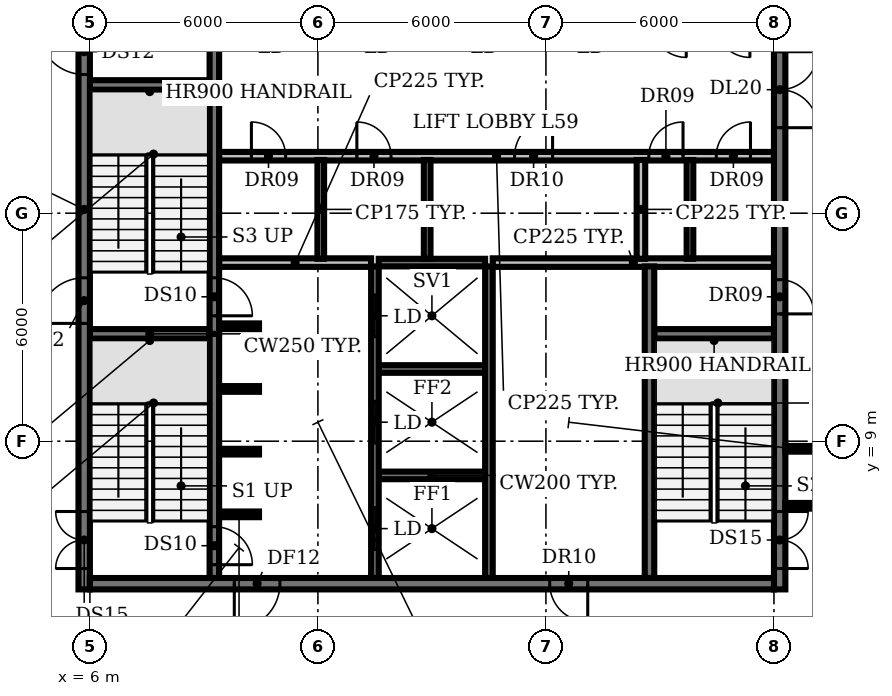
"""IFC4 building model, lengths in metres.
Left out: names, types, materials, properties, quantities, classifications, styles, units other than length and angle.
Written with IfcOpenShell. Run it as: python <this file> out.ifc"""

import sys

from ifc_helpers import new_model, si_unit, direction, frame, frame_2d, origin, place, context, subcontext, project, spatial, rectangle, extrude, element, fill, save


model = new_model("IFC4")
c1 = context("Model", 3, precision=1e-05, world=origin(), true_north=direction((0.0, 1.0)))
c2 = subcontext(c1, "Body", "Model", "MODEL_VIEW")
j1 = project(units=[si_unit("LENGTHUNIT", "METRE"), si_unit("PLANEANGLEUNIT", "RADIAN")], contexts=[c1])
p1 = place(None, origin())
s1 = spatial("IfcSite", under=j1, at=p1, CompositionType="ELEMENT")
p2 = place(p1, origin())
s2 = spatial("IfcBuilding", under=s1, at=p2, CompositionType="ELEMENT")
p3 = place(p2, frame((0.0, 0.0, 268.4)))
s3 = spatial("IfcBuildingStorey", under=s2, at=p3, CompositionType="ELEMENT", Elevation=268.4)
p4 = place(p3, frame((9.4, 7.075, 0.0), z_axis=(0.0, 0.0, 1.0), x_axis=(1.0, 0.0, 0.0)))
e1 = element("IfcWall", 1, at=p4, inside=s3, PredefinedType="SHEAR", context=c2, shape_type="SweptSolid", body=[
    extrude(rectangle(XDim=1.05, YDim=0.15, at=frame_2d((0.525, 0.0))), origin(), (0.0, 0.0, 1.0), 3.8),
])
p5 = place(p3, frame((13.6, 8.1, 0.0), z_axis=(0.0, 0.0, 1.0), x_axis=(1.0, 0.0, 0.0)))
e2 = element("IfcWall", 2, at=p5, inside=s3, PredefinedType="SHEAR", context=c2, shape_type="SweptSolid", body=[
    extrude(rectangle(XDim=2.8, YDim=0.2, at=frame_2d((1.4, 0.0))), origin(), (0.0, 0.0, 1.0), 3.8),
])
for number, where, z_axis, x_axis in (
    (3, (9.4, 8.725, 0.0), (0.0, 0.0, 1.0), (1.0, 0.0, 0.0)),
    (4, (9.4, 10.375, 0.0), (0.0, 0.0, 1.0), (1.0, 0.0, 0.0)),
):
    element("IfcWall", number, at=place(p3, frame(where, z_axis=z_axis, x_axis=x_axis)), inside=s3, PredefinedType="SHEAR", context=c2, shape_type="SweptSolid", body=[
        extrude(rectangle(XDim=1.05, YDim=0.15, at=frame_2d((0.525, 0.0))), origin(), (0.0, 0.0, 1.0), 3.8),
    ])
p6 = place(p3, frame((13.6, 10.9, 0.0), z_axis=(0.0, 0.0, 1.0), x_axis=(1.0, 0.0, 0.0)))
e5 = element("IfcWall", 5, at=p6, inside=s3, PredefinedType="SHEAR", context=c2, shape_type="SweptSolid", body=[
    extrude(rectangle(XDim=2.8, YDim=0.2, at=frame_2d((1.4, 0.0))), origin(), (0.0, 0.0, 1.0), 3.8),
])
for number, where, z_axis, x_axis in (
    (6, (6.0, 11.825, 0.0), (0.0, 0.0, 1.0), (1.0, 0.0, 0.0)),
    (7, (20.85, 11.825, 0.0), (0.0, 0.0, 1.0), (1.0, 0.0, 0.0)),
):
    element("IfcWall", number, at=place(p3, frame(where, z_axis=z_axis, x_axis=x_axis)), inside=s3, PredefinedType="SHEAR", context=c2, shape_type="SweptSolid", body=[
        extrude(rectangle(XDim=3.15, YDim=0.25, at=frame_2d((1.575, 0.0))), origin(), (0.0, 0.0, 1.0), 3.8),
    ])
p7 = place(p3, frame((9.4, 12.025, 0.0), z_axis=(0.0, 0.0, 1.0), x_axis=(1.0, 0.0, 0.0)))
e8 = element("IfcWall", 8, at=p7, inside=s3, PredefinedType="SHEAR", context=c2, shape_type="SweptSolid", body=[
    extrude(rectangle(XDim=1.05, YDim=0.15, at=frame_2d((0.525, 0.0))), origin(), (0.0, 0.0, 1.0), 3.8),
])
p8 = place(p3, frame((9.4, 13.7, 0.0), z_axis=(0.0, 0.0, 1.0), x_axis=(1.0, 0.0, 0.0)))
e9 = element("IfcWall", 9, at=p8, inside=s3, PredefinedType="PARTITIONING", context=c2, shape_type="SweptSolid", body=[
    extrude(rectangle(XDim=4.0, YDim=0.225, at=frame_2d((2.0, 0.0))), origin(), (0.0, 0.0, 1.0), 3.8),
])
p9 = place(p3, frame((13.6, 13.7, 0.0), z_axis=(0.0, 0.0, 1.0), x_axis=(1.0, 0.0, 0.0)))
e10 = element("IfcWall", 10, at=p9, inside=s3, PredefinedType="SHEAR", context=c2, shape_type="SweptSolid", body=[
    extrude(rectangle(XDim=2.8, YDim=0.2, at=frame_2d((1.4, 0.0))), origin(), (0.0, 0.0, 1.0), 3.8),
])
p10 = place(p3, frame((16.6, 13.7, 0.0), z_axis=(0.0, 0.0, 1.0), x_axis=(1.0, 0.0, 0.0)))
e11 = element("IfcWall", 11, at=p10, inside=s3, PredefinedType="PARTITIONING", context=c2, shape_type="SweptSolid", body=[
    extrude(rectangle(XDim=7.4, YDim=0.225, at=frame_2d((3.7, 0.0))), origin(), (0.0, 0.0, 1.0), 3.8),
])
p11 = place(p3, frame((9.4, 16.5, 0.0), z_axis=(0.0, 0.0, 1.0), x_axis=(1.0, 0.0, 0.0)))
e12 = element("IfcWall", 12, at=p11, inside=s3, PredefinedType="PARTITIONING", context=c2, shape_type="SweptSolid", body=[
    extrude(rectangle(XDim=14.6, YDim=0.225, at=frame_2d((7.3, 0.0))), origin(), (0.0, 0.0, 1.0), 3.8),
])
p12 = place(p11, frame((0.85, 0.0, 0.0)))
e13 = element("IfcOpeningElement", 13, at=p12, cuts=e12, PredefinedType="OPENING", context=c2, shape_type="SweptSolid", body=[
    extrude(rectangle(XDim=0.9, YDim=2.1, at=frame_2d((0.45, 1.05))), frame((0.0, 0.123, 0.0), z_axis=(0.0, -1.0, 0.0), x_axis=(1.0, 0.0, 0.0)), (0.0, 0.0, 1.0), 0.245),
])
p13 = place(p11, frame((3.625, 0.0, 0.0)))
e14 = element("IfcOpeningElement", 14, at=p13, cuts=e12, PredefinedType="OPENING", context=c2, shape_type="SweptSolid", body=[
    extrude(rectangle(XDim=0.9, YDim=2.1, at=frame_2d((0.45, 1.05))), frame((0.0, 0.123, 0.0), z_axis=(0.0, -1.0, 0.0), x_axis=(1.0, 0.0, 0.0)), (0.0, 0.0, 1.0), 0.245),
])
p14 = place(p11, frame((7.775, 0.0, 0.0)))
e15 = element("IfcOpeningElement", 15, at=p14, cuts=e12, PredefinedType="OPENING", context=c2, shape_type="SweptSolid", body=[
    extrude(rectangle(XDim=1.0, YDim=2.1, at=frame_2d((0.5, 1.05))), frame((0.0, 0.123, 0.0), z_axis=(0.0, -1.0, 0.0), x_axis=(1.0, 0.0, 0.0)), (0.0, 0.0, 1.0), 0.245),
])
p15 = place(p11, frame((11.308, 0.0, 0.0)))
e16 = element("IfcOpeningElement", 16, at=p15, cuts=e12, PredefinedType="OPENING", context=c2, shape_type="SweptSolid", body=[
    extrude(rectangle(XDim=0.9, YDim=2.1, at=frame_2d((0.45, 1.05))), frame((0.0, 0.123, 0.0), z_axis=(0.0, -1.0, 0.0), x_axis=(1.0, 0.0, 0.0)), (0.0, 0.0, 1.0), 0.245),
])
p16 = place(p11, frame((13.083, 0.0, 0.0)))
e17 = element("IfcOpeningElement", 17, at=p16, cuts=e12, PredefinedType="OPENING", context=c2, shape_type="SweptSolid", body=[
    extrude(rectangle(XDim=0.9, YDim=2.1, at=frame_2d((0.45, 1.05))), frame((0.0, 0.123, 0.0), z_axis=(0.0, -1.0, 0.0), x_axis=(1.0, 0.0, 0.0)), (0.0, 0.0, 1.0), 0.245),
])
p17 = place(p3, frame((6.0, 18.375, 0.0), z_axis=(0.0, 0.0, 1.0), x_axis=(1.0, 0.0, 0.0)))
e18 = element("IfcWall", 18, at=p17, inside=s3, PredefinedType="SHEAR", context=c2, shape_type="SweptSolid", body=[
    extrude(rectangle(XDim=3.15, YDim=0.25, at=frame_2d((1.575, 0.0))), origin(), (0.0, 0.0, 1.0), 3.8),
])
p18 = place(p3, frame((9.275, 11.825, 0.0), z_axis=(0.0, 0.0, 1.0), x_axis=(0.0, -1.0, 0.0)))
e19 = element("IfcWall", 19, at=p18, inside=s3, PredefinedType="SHEAR", context=c2, shape_type="SweptSolid", body=[
    extrude(rectangle(XDim=6.425, YDim=0.25, at=frame_2d((3.212, 0.0))), origin(), (0.0, 0.0, 1.0), 3.8),
])
p19 = place(p18, frame((5.075, 0.0, 0.0)))
e20 = element("IfcOpeningElement", 20, at=p19, cuts=e19, PredefinedType="OPENING", context=c2, shape_type="SweptSolid", body=[
    extrude(rectangle(XDim=1.0, YDim=2.1, at=frame_2d((0.5, 1.05))), frame((0.0, 0.135, 0.0), z_axis=(0.0, -1.0, 0.0), x_axis=(1.0, 0.0, 0.0)), (0.0, 0.0, 1.0), 0.27),
])
p20 = place(p3, frame((9.275, 18.375, 0.0), z_axis=(0.0, 0.0, 1.0), x_axis=(0.0, -1.0, 0.0)))
e21 = element("IfcWall", 21, at=p20, inside=s3, PredefinedType="SHEAR", context=c2, shape_type="SweptSolid", body=[
    extrude(rectangle(XDim=6.55, YDim=0.25, at=frame_2d((3.275, 0.0))), origin(), (0.0, 0.0, 1.0), 3.8),
])
p21 = place(p20, frame((5.075, 0.0, 0.0)))
e22 = element("IfcOpeningElement", 22, at=p21, cuts=e21, PredefinedType="OPENING", context=c2, shape_type="SweptSolid", body=[
    extrude(rectangle(XDim=1.0, YDim=2.1, at=frame_2d((0.5, 1.05))), frame((0.0, 0.135, 0.0), z_axis=(0.0, -1.0, 0.0), x_axis=(1.0, 0.0, 0.0)), (0.0, 0.0, 1.0), 0.27),
])
p22 = place(p3, frame((9.275, 18.375, 0.0), z_axis=(0.0, 0.0, 1.0), x_axis=(0.0, 1.0, 0.0)))
e23 = element("IfcWall", 23, at=p22, inside=s3, PredefinedType="SHEAR", context=c2, shape_type="SweptSolid", body=[
    extrude(rectangle(XDim=6.425, YDim=0.25, at=frame_2d((3.212, 0.0))), origin(), (0.0, 0.0, 1.0), 3.8),
])
p23 = place(p3, frame((12.075, 13.8, 0.0), z_axis=(0.0, 0.0, 1.0), x_axis=(0.0, 1.0, 0.0)))
e24 = element("IfcWall", 24, at=p23, inside=s3, PredefinedType="PARTITIONING", context=c2, shape_type="SweptSolid", body=[
    extrude(rectangle(XDim=2.6, YDim=0.175, at=frame_2d((1.3, 0.0))), origin(), (0.0, 0.0, 1.0), 3.8),
])
p24 = place(p3, frame((13.5, 5.4, 0.0), z_axis=(0.0, 0.0, 1.0), x_axis=(0.0, 1.0, 0.0)))
e25 = element("IfcWall", 25, at=p24, inside=s3, PredefinedType="SHEAR", context=c2, shape_type="SweptSolid", body=[
    extrude(rectangle(XDim=8.2, YDim=0.2, at=frame_2d((4.1, 0.0))), origin(), (0.0, 0.0, 1.0), 3.8),
])
p25 = place(p24, frame((0.75, 0.0, 0.0)))
e26 = element("IfcOpeningElement", 26, at=p25, cuts=e25, PredefinedType="OPENING", context=c2, shape_type="SweptSolid", body=[
    extrude(rectangle(XDim=1.1, YDim=2.1, at=frame_2d((0.55, 1.05))), frame((0.0, 0.11, 0.0), z_axis=(0.0, -1.0, 0.0), x_axis=(1.0, 0.0, 0.0)), (0.0, 0.0, 1.0), 0.22),
])
p26 = place(p24, frame((3.55, 0.0, 0.0)))
e27 = element("IfcOpeningElement", 27, at=p26, cuts=e25, PredefinedType="OPENING", context=c2, shape_type="SweptSolid", body=[
    extrude(rectangle(XDim=1.1, YDim=2.1, at=frame_2d((0.55, 1.05))), frame((0.0, 0.11, 0.0), z_axis=(0.0, -1.0, 0.0), x_axis=(1.0, 0.0, 0.0)), (0.0, 0.0, 1.0), 0.22),
])
p27 = place(p24, frame((6.35, 0.0, 0.0)))
e28 = element("IfcOpeningElement", 28, at=p27, cuts=e25, PredefinedType="OPENING", context=c2, shape_type="SweptSolid", body=[
    extrude(rectangle(XDim=1.1, YDim=2.1, at=frame_2d((0.55, 1.05))), frame((0.0, 0.11, 0.0), z_axis=(0.0, -1.0, 0.0), x_axis=(1.0, 0.0, 0.0)), (0.0, 0.0, 1.0), 0.22),
])
p28 = place(p3, frame((14.875, 13.8, 0.0), z_axis=(0.0, 0.0, 1.0), x_axis=(0.0, 1.0, 0.0)))
e29 = element("IfcWall", 29, at=p28, inside=s3, PredefinedType="PARTITIONING", context=c2, shape_type="SweptSolid", body=[
    extrude(rectangle(XDim=2.6, YDim=0.175, at=frame_2d((1.3, 0.0))), origin(), (0.0, 0.0, 1.0), 3.8),
])
p29 = place(p3, frame((16.5, 5.4, 0.0), z_axis=(0.0, 0.0, 1.0), x_axis=(0.0, 1.0, 0.0)))
e30 = element("IfcWall", 30, at=p29, inside=s3, PredefinedType="SHEAR", context=c2, shape_type="SweptSolid", body=[
    extrude(rectangle(XDim=8.2, YDim=0.2, at=frame_2d((4.1, 0.0))), origin(), (0.0, 0.0, 1.0), 3.8),
])
p30 = place(p3, frame((20.5, 13.8, 0.0), z_axis=(0.0, 0.0, 1.0), x_axis=(0.0, 1.0, 0.0)))
e31 = element("IfcWall", 31, at=p30, inside=s3, PredefinedType="PARTITIONING", context=c2, shape_type="SweptSolid", body=[
    extrude(rectangle(XDim=2.6, YDim=0.225, at=frame_2d((1.3, 0.0))), origin(), (0.0, 0.0, 1.0), 3.8),
])
p31 = place(p3, frame((20.725, 5.4, 0.0), z_axis=(0.0, 0.0, 1.0), x_axis=(0.0, 1.0, 0.0)))
e32 = element("IfcWall", 32, at=p31, inside=s3, PredefinedType="SHEAR", context=c2, shape_type="SweptSolid", body=[
    extrude(rectangle(XDim=8.2, YDim=0.25, at=frame_2d((4.1, 0.0))), origin(), (0.0, 0.0, 1.0), 3.8),
])
p32 = place(p3, frame((21.79, 13.8, 0.0), z_axis=(0.0, 0.0, 1.0), x_axis=(0.0, 1.0, 0.0)))
e33 = element("IfcWall", 33, at=p32, inside=s3, PredefinedType="PARTITIONING", context=c2, shape_type="SweptSolid", body=[
    extrude(rectangle(XDim=2.6, YDim=0.175, at=frame_2d((1.3, 0.0))), origin(), (0.0, 0.0, 1.0), 3.8),
])
p33 = place(p3, frame((5.85, 5.1, 0.0), z_axis=(0.0, 0.0, 1.0), x_axis=(0.0, 1.0, 0.0)))
e34 = element("IfcWall", 34, at=p33, inside=s3, PredefinedType="SHEAR", context=c2, shape_type="SweptSolid", body=[
    extrude(rectangle(XDim=20.0, YDim=0.3, at=frame_2d((10.0, 0.0))), origin(), (0.0, 0.0, 1.0), 3.8),
])
p34 = place(p33, frame((0.55, 0.0, 0.0)))
e35 = element("IfcOpeningElement", 35, at=p34, cuts=e34, PredefinedType="OPENING", context=c2, shape_type="SweptSolid", body=[
    extrude(rectangle(XDim=1.5, YDim=2.1, at=frame_2d((0.75, 1.05))), frame((0.0, 0.16, 0.0), z_axis=(0.0, -1.0, 0.0), x_axis=(1.0, 0.0, 0.0)), (0.0, 0.0, 1.0), 0.32),
])
p35 = place(p33, frame((7.0, 0.0, 0.0)))
e36 = element("IfcOpeningElement", 36, at=p35, cuts=e34, PredefinedType="OPENING", context=c2, shape_type="SweptSolid", body=[
    extrude(rectangle(XDim=1.2, YDim=2.1, at=frame_2d((0.6, 1.05))), frame((0.0, 0.16, 0.0), z_axis=(0.0, -1.0, 0.0), x_axis=(1.0, 0.0, 0.0)), (0.0, 0.0, 1.0), 0.32),
])
p36 = place(p33, frame((13.55, 0.0, 0.0)))
e37 = element("IfcOpeningElement", 37, at=p36, cuts=e34, PredefinedType="OPENING", context=c2, shape_type="SweptSolid", body=[
    extrude(rectangle(XDim=1.2, YDim=2.1, at=frame_2d((0.6, 1.05))), frame((0.0, 0.16, 0.0), z_axis=(0.0, -1.0, 0.0), x_axis=(1.0, 0.0, 0.0)), (0.0, 0.0, 1.0), 0.32),
])
p37 = place(p3, frame((24.15, 25.655, 0.0), z_axis=(0.0, 0.0, 1.0), x_axis=(0.0, -1.0, 0.0)))
e38 = element("IfcWall", 38, at=p37, inside=s3, PredefinedType="SHEAR", context=c2, shape_type="SweptSolid", body=[
    extrude(rectangle(XDim=20.555, YDim=0.3, at=frame_2d((10.277, 0.0))), origin(), (0.0, 0.0, 1.0), 3.8),
])
p38 = place(p37, frame((18.505, 0.0, 0.0)))
e39 = element("IfcOpeningElement", 39, at=p38, cuts=e38, PredefinedType="OPENING", context=c2, shape_type="SweptSolid", body=[
    extrude(rectangle(XDim=1.5, YDim=2.1, at=frame_2d((0.75, 1.05))), frame((0.0, 0.16, 0.0), z_axis=(0.0, -1.0, 0.0), x_axis=(1.0, 0.0, 0.0)), (0.0, 0.0, 1.0), 0.32),
])
p39 = place(p37, frame((12.405, 0.0, 0.0)))
e40 = element("IfcOpeningElement", 40, at=p39, cuts=e38, PredefinedType="OPENING", context=c2, shape_type="SweptSolid", body=[
    extrude(rectangle(XDim=0.9, YDim=2.1, at=frame_2d((0.45, 1.05))), frame((0.0, 0.16, 0.0), z_axis=(0.0, -1.0, 0.0), x_axis=(1.0, 0.0, 0.0)), (0.0, 0.0, 1.0), 0.32),
])
p40 = place(p37, frame((6.405, 0.0, 0.0)))
e41 = element("IfcOpeningElement", 41, at=p40, cuts=e38, PredefinedType="OPENING", context=c2, shape_type="SweptSolid", body=[
    extrude(rectangle(XDim=2.0, YDim=2.1, at=frame_2d((1.0, 1.05))), frame((0.0, 0.16, 0.0), z_axis=(0.0, -1.0, 0.0), x_axis=(1.0, 0.0, 0.0)), (0.0, 0.0, 1.0), 0.32),
])
p41 = place(p3, frame((24.0, 5.25, 0.0), z_axis=(0.0, 0.0, 1.0), x_axis=(-1.0, 0.0, 0.0)))
e42 = element("IfcWall", 42, at=p41, inside=s3, PredefinedType="SHEAR", context=c2, shape_type="SweptSolid", body=[
    extrude(rectangle(XDim=18.0, YDim=0.3, at=frame_2d((9.0, 0.0))), origin(), (0.0, 0.0, 1.0), 3.8),
])
p42 = place(p41, frame((13.0, 0.0, 0.0)))
e43 = element("IfcOpeningElement", 43, at=p42, cuts=e42, PredefinedType="OPENING", context=c2, shape_type="SweptSolid", body=[
    extrude(rectangle(XDim=1.2, YDim=2.1, at=frame_2d((0.6, 1.05))), frame((0.0, 0.16, 0.0), z_axis=(0.0, -1.0, 0.0), x_axis=(1.0, 0.0, 0.0)), (0.0, 0.0, 1.0), 0.32),
])
p43 = place(p41, frame((4.9, 0.0, 0.0)))
e44 = element("IfcOpeningElement", 44, at=p43, cuts=e42, PredefinedType="OPENING", context=c2, shape_type="SweptSolid", body=[
    extrude(rectangle(XDim=1.0, YDim=2.1, at=frame_2d((0.5, 1.05))), frame((0.0, 0.16, 0.0), z_axis=(0.0, -1.0, 0.0), x_axis=(1.0, 0.0, 0.0)), (0.0, 0.0, 1.0), 0.32),
])
for number, where, z_axis, x_axis in (
    (45, (24.3, 7.3, 0.0), (0.0, 0.0, 1.0), (1.0, 0.0, 0.0)),
    (46, (24.3, 8.8, 0.0), (0.0, 0.0, 1.0), (1.0, 0.0, 0.0)),
):
    element("IfcWall", number, at=place(p3, frame(where, z_axis=z_axis, x_axis=x_axis)), inside=s3, PredefinedType="PARTITIONING", context=c2, shape_type="SweptSolid", body=[
        extrude(rectangle(XDim=1.05, YDim=0.15, at=frame_2d((0.525, 0.0))), origin(), (0.0, 0.0, 1.0), 2.85),
    ])
p44 = place(p12, origin())
e47 = element("IfcDoor", 47, at=p44, inside=s3, OperationType="SINGLE_SWING_LEFT", PredefinedType="DOOR", context=c2, shape_type="SweptSolid", body=[
    extrude(rectangle(XDim=0.9, YDim=2.1, at=frame_2d((0.45, 1.05))), frame((0.0, 0.025, 0.0), z_axis=(0.0, -1.0, 0.0), x_axis=(1.0, 0.0, 0.0)), (0.0, 0.0, 1.0), 0.05),
])
fill(e13, e47)
p45 = place(p13, origin())
e48 = element("IfcDoor", 48, at=p45, inside=s3, OperationType="SINGLE_SWING_LEFT", PredefinedType="DOOR", context=c2, shape_type="SweptSolid", body=[
    extrude(rectangle(XDim=0.9, YDim=2.1, at=frame_2d((0.45, 1.05))), frame((0.0, 0.025, 0.0), z_axis=(0.0, -1.0, 0.0), x_axis=(1.0, 0.0, 0.0)), (0.0, 0.0, 1.0), 0.05),
])
fill(e14, e48)
p46 = place(p14, origin())
e49 = element("IfcDoor", 49, at=p46, inside=s3, OperationType="SINGLE_SWING_RIGHT", PredefinedType="DOOR", context=c2, shape_type="SweptSolid", body=[
    extrude(rectangle(XDim=1.0, YDim=2.1, at=frame_2d((0.5, 1.05))), frame((0.0, 0.025, 0.0), z_axis=(0.0, -1.0, 0.0), x_axis=(1.0, 0.0, 0.0)), (0.0, 0.0, 1.0), 0.05),
])
fill(e15, e49)
p47 = place(p15, origin())
e50 = element("IfcDoor", 50, at=p47, inside=s3, OperationType="SINGLE_SWING_RIGHT", PredefinedType="DOOR", context=c2, shape_type="SweptSolid", body=[
    extrude(rectangle(XDim=0.9, YDim=2.1, at=frame_2d((0.45, 1.05))), frame((0.0, 0.025, 0.0), z_axis=(0.0, -1.0, 0.0), x_axis=(1.0, 0.0, 0.0)), (0.0, 0.0, 1.0), 0.05),
])
fill(e16, e50)
p48 = place(p16, origin())
e51 = element("IfcDoor", 51, at=p48, inside=s3, OperationType="SINGLE_SWING_RIGHT", PredefinedType="DOOR", context=c2, shape_type="SweptSolid", body=[
    extrude(rectangle(XDim=0.9, YDim=2.1, at=frame_2d((0.45, 1.05))), frame((0.0, 0.025, 0.0), z_axis=(0.0, -1.0, 0.0), x_axis=(1.0, 0.0, 0.0)), (0.0, 0.0, 1.0), 0.05),
])
fill(e17, e51)
p49 = place(p19, origin())
e52 = element("IfcDoor", 52, at=p49, inside=s3, OperationType="SINGLE_SWING_RIGHT", PredefinedType="DOOR", context=c2, shape_type="SweptSolid", body=[
    extrude(rectangle(XDim=1.0, YDim=2.1, at=frame_2d((0.5, 1.05))), frame((0.0, 0.025, 0.0), z_axis=(0.0, -1.0, 0.0), x_axis=(1.0, 0.0, 0.0)), (0.0, 0.0, 1.0), 0.05),
])
fill(e20, e52)
p50 = place(p21, origin())
e53 = element("IfcDoor", 53, at=p50, inside=s3, OperationType="SINGLE_SWING_RIGHT", PredefinedType="DOOR", context=c2, shape_type="SweptSolid", body=[
    extrude(rectangle(XDim=1.0, YDim=2.1, at=frame_2d((0.5, 1.05))), frame((0.0, 0.025, 0.0), z_axis=(0.0, -1.0, 0.0), x_axis=(1.0, 0.0, 0.0)), (0.0, 0.0, 1.0), 0.05),
])
fill(e22, e53)
p51 = place(p25, origin())
e54 = element("IfcDoor", 54, at=p51, inside=s3, OperationType="DOUBLE_DOOR_SLIDING", PredefinedType="DOOR", context=c2, shape_type="SweptSolid", body=[
    extrude(rectangle(XDim=1.1, YDim=2.1, at=frame_2d((0.55, 1.05))), frame((0.0, 0.025, 0.0), z_axis=(0.0, -1.0, 0.0), x_axis=(1.0, 0.0, 0.0)), (0.0, 0.0, 1.0), 0.05),
])
fill(e26, e54)
p52 = place(p26, origin())
e55 = element("IfcDoor", 55, at=p52, inside=s3, OperationType="DOUBLE_DOOR_SLIDING", PredefinedType="DOOR", context=c2, shape_type="SweptSolid", body=[
    extrude(rectangle(XDim=1.1, YDim=2.1, at=frame_2d((0.55, 1.05))), frame((0.0, 0.025, 0.0), z_axis=(0.0, -1.0, 0.0), x_axis=(1.0, 0.0, 0.0)), (0.0, 0.0, 1.0), 0.05),
])
fill(e27, e55)
p53 = place(p27, origin())
e56 = element("IfcDoor", 56, at=p53, inside=s3, OperationType="DOUBLE_DOOR_SLIDING", PredefinedType="DOOR", context=c2, shape_type="SweptSolid", body=[
    extrude(rectangle(XDim=1.1, YDim=2.1, at=frame_2d((0.55, 1.05))), frame((0.0, 0.025, 0.0), z_axis=(0.0, -1.0, 0.0), x_axis=(1.0, 0.0, 0.0)), (0.0, 0.0, 1.0), 0.05),
])
fill(e28, e56)
p54 = place(p34, origin())
e57 = element("IfcDoor", 57, at=p54, inside=s3, OperationType="DOUBLE_DOOR_SINGLE_SWING", PredefinedType="DOOR", context=c2, shape_type="SweptSolid", body=[
    extrude(rectangle(XDim=1.5, YDim=2.1, at=frame_2d((0.75, 1.05))), frame((0.0, 0.025, 0.0), z_axis=(0.0, -1.0, 0.0), x_axis=(1.0, 0.0, 0.0)), (0.0, 0.0, 1.0), 0.05),
])
fill(e35, e57)
p55 = place(p35, origin())
e58 = element("IfcDoor", 58, at=p55, inside=s3, OperationType="SINGLE_SWING_LEFT", PredefinedType="DOOR", context=c2, shape_type="SweptSolid", body=[
    extrude(rectangle(XDim=1.2, YDim=2.1, at=frame_2d((0.6, 1.05))), frame((0.0, 0.025, 0.0), z_axis=(0.0, -1.0, 0.0), x_axis=(1.0, 0.0, 0.0)), (0.0, 0.0, 1.0), 0.05),
])
fill(e36, e58)
p56 = place(p36, origin())
e59 = element("IfcDoor", 59, at=p56, inside=s3, OperationType="SINGLE_SWING_RIGHT", PredefinedType="DOOR", context=c2, shape_type="SweptSolid", body=[
    extrude(rectangle(XDim=1.2, YDim=2.1, at=frame_2d((0.6, 1.05))), frame((0.0, 0.025, 0.0), z_axis=(0.0, -1.0, 0.0), x_axis=(1.0, 0.0, 0.0)), (0.0, 0.0, 1.0), 0.05),
])
fill(e37, e59)
p57 = place(p38, origin())
e60 = element("IfcDoor", 60, at=p57, inside=s3, OperationType="DOUBLE_DOOR_SINGLE_SWING", PredefinedType="DOOR", context=c2, shape_type="SweptSolid", body=[
    extrude(rectangle(XDim=1.5, YDim=2.1, at=frame_2d((0.75, 1.05))), frame((0.0, 0.025, 0.0), z_axis=(0.0, -1.0, 0.0), x_axis=(1.0, 0.0, 0.0)), (0.0, 0.0, 1.0), 0.05),
])
fill(e39, e60)
p58 = place(p39, origin())
e61 = element("IfcDoor", 61, at=p58, inside=s3, OperationType="SINGLE_SWING_RIGHT", PredefinedType="DOOR", context=c2, shape_type="SweptSolid", body=[
    extrude(rectangle(XDim=0.9, YDim=2.1, at=frame_2d((0.45, 1.05))), frame((0.0, 0.025, 0.0), z_axis=(0.0, -1.0, 0.0), x_axis=(1.0, 0.0, 0.0)), (0.0, 0.0, 1.0), 0.05),
])
fill(e40, e61)
p59 = place(p40, origin())
e62 = element("IfcDoor", 62, at=p59, inside=s3, OperationType="DOUBLE_DOOR_SINGLE_SWING", PredefinedType="DOOR", context=c2, shape_type="SweptSolid", body=[
    extrude(rectangle(XDim=2.0, YDim=2.1, at=frame_2d((1.0, 1.05))), frame((0.0, 0.025, 0.0), z_axis=(0.0, -1.0, 0.0), x_axis=(1.0, 0.0, 0.0)), (0.0, 0.0, 1.0), 0.05),
])
fill(e41, e62)
p60 = place(p42, origin())
e63 = element("IfcDoor", 63, at=p60, inside=s3, OperationType="SINGLE_SWING_RIGHT", PredefinedType="DOOR", context=c2, shape_type="SweptSolid", body=[
    extrude(rectangle(XDim=1.2, YDim=2.1, at=frame_2d((0.6, 1.05))), frame((0.0, 0.025, 0.0), z_axis=(0.0, -1.0, 0.0), x_axis=(1.0, 0.0, 0.0)), (0.0, 0.0, 1.0), 0.05),
])
fill(e43, e63)
p61 = place(p43, origin())
e64 = element("IfcDoor", 64, at=p61, inside=s3, OperationType="SINGLE_SWING_LEFT", PredefinedType="DOOR", context=c2, shape_type="SweptSolid", body=[
    extrude(rectangle(XDim=1.0, YDim=2.1, at=frame_2d((0.5, 1.05))), frame((0.0, 0.025, 0.0), z_axis=(0.0, -1.0, 0.0), x_axis=(1.0, 0.0, 0.0)), (0.0, 0.0, 1.0), 0.05),
])
fill(e44, e64)
save(model, sys.argv[1])
